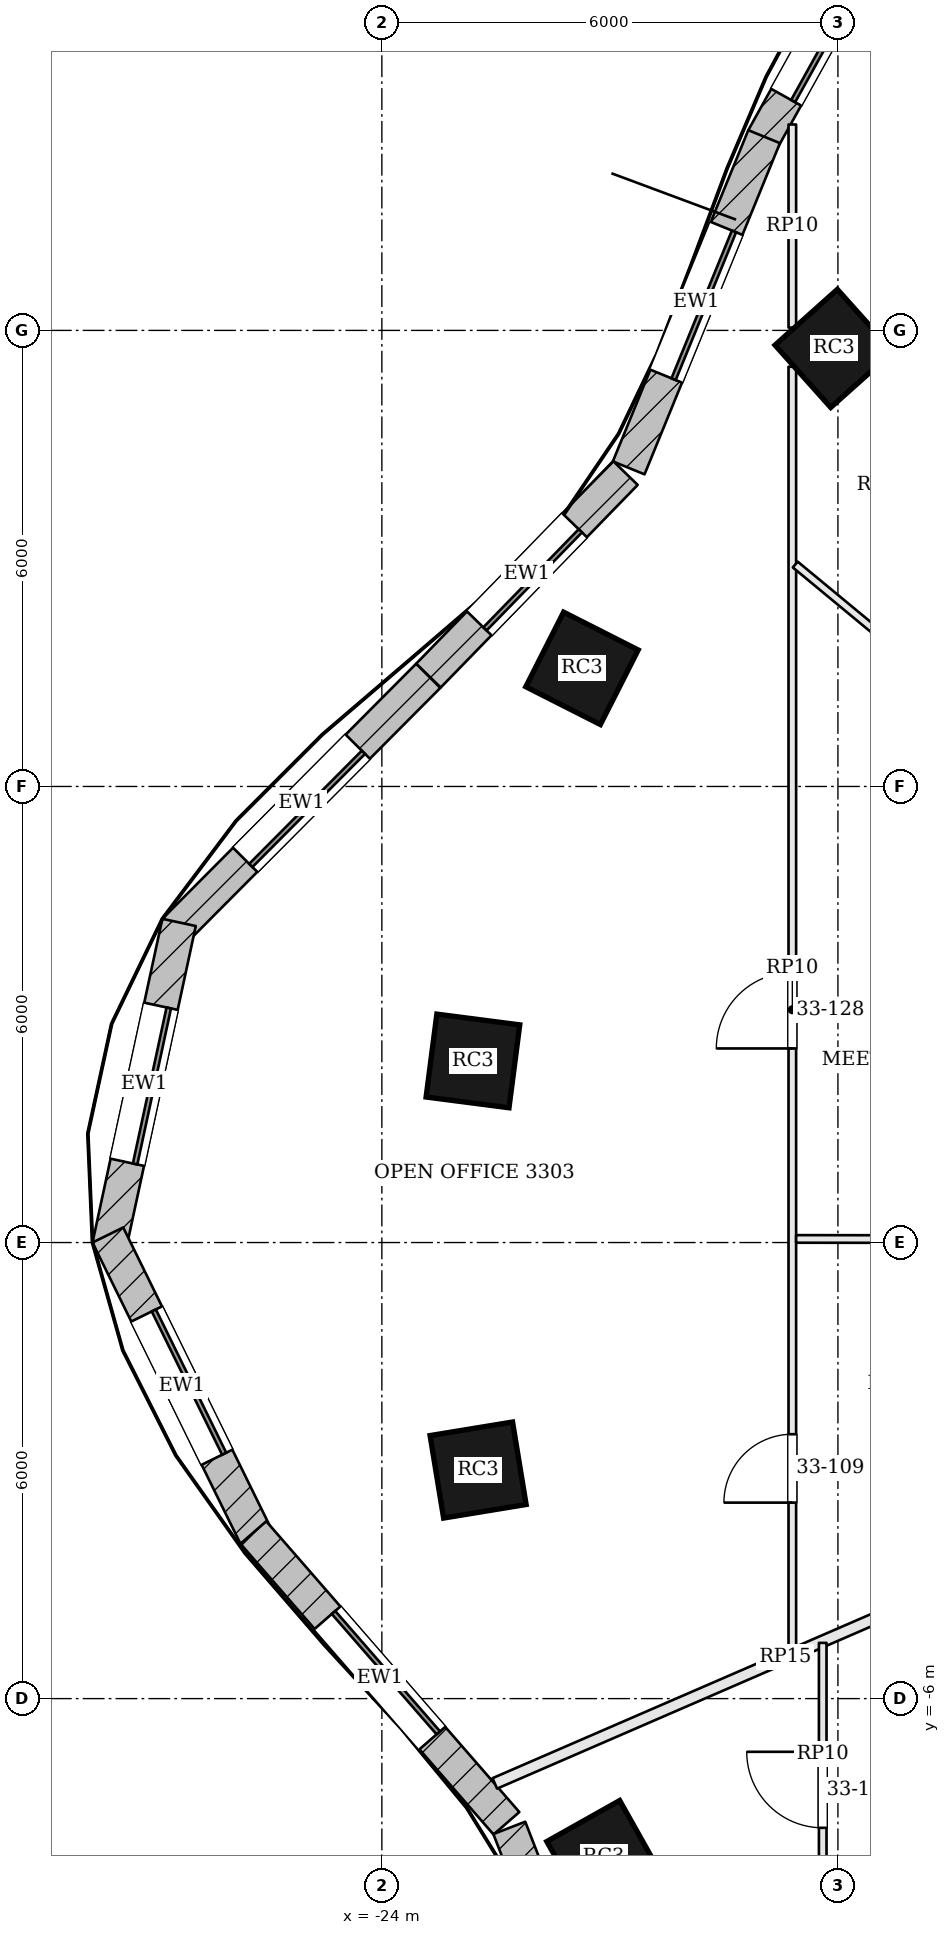
"""IFC4 building model, lengths in metres.
Left out: names, types, materials, properties, quantities, classifications, styles, units other than length and angle.
Written with IfcOpenShell. Run it as: python <this file> out.ifc"""

import sys

from ifc_helpers import new_model, si_unit, direction, frame, frame_2d, origin, origin_2d, place, context, subcontext, project, spatial, rectangle, extrude, element, fill, save


model = new_model("IFC4")
c1 = context("Model", 3, precision=1e-05, world=origin(), true_north=direction((0.0, 1.0)))
c2 = subcontext(c1, "Body", "Model", "MODEL_VIEW")
j1 = project(units=[si_unit("LENGTHUNIT", "METRE"), si_unit("PLANEANGLEUNIT", "RADIAN")], contexts=[c1])
p1 = place(None, origin())
s1 = spatial("IfcSite", under=j1, at=p1, CompositionType="ELEMENT")
p2 = place(p1, origin())
s2 = spatial("IfcBuilding", under=s1, at=p2, CompositionType="ELEMENT")
p3 = place(p2, frame((0.0, 0.0, 138.3)))
s3 = spatial("IfcBuildingStorey", under=s2, at=p3, CompositionType="ELEMENT", Elevation=138.3)
for number, where, z_axis, x_axis in (
    (1, (-18.051, 11.763, 0.0), (0.0, 0.0, 1.0), (-0.746, -0.666, 0.0)),
    (2, (-21.367, 7.554, 0.0), (0.0, 0.0, 1.0), (-0.452, -0.892, 0.0)),
    (3, (-22.802, 2.389, 0.0), (0.0, 0.0, 1.0), (-0.129, -0.992, 0.0)),
    (4, (-22.734, -2.993, 0.0), (0.0, 0.0, 1.0), (0.162, -0.987, 0.0)),
    (5, (-21.081, -8.09, 0.0), (0.0, 0.0, 1.0), (0.49, -0.872, 0.0)),
):
    element("IfcColumn", number, at=place(p3, frame(where, z_axis=z_axis, x_axis=x_axis)), inside=s3, PredefinedType="COLUMN", context=c2, shape_type="SweptSolid", body=[
        extrude(rectangle(XDim=1.1, YDim=1.1, at=origin_2d()), origin(), (0.0, 0.0, 1.0), 3.9),
    ])
p4 = place(p3, frame((-17.359, 17.447, 0.0), z_axis=(0.0, 0.0, 1.0), x_axis=(-0.485618126214, -0.874171056197, 0.0)))
e6 = element("IfcWall", 6, at=p4, inside=s3, PredefinedType="SOLIDWALL", context=c2, shape_type="SweptSolid", body=[
    extrude(rectangle(XDim=3.343, YDim=0.45, at=frame_2d((1.671, 0.0))), origin(), (0.0, 0.0, 1.0), 3.7),
])
p5 = place(p4, frame((0.621, 0.0, 0.9)))
e7 = element("IfcOpeningElement", 7, at=p5, cuts=e6, PredefinedType="OPENING", context=c2, shape_type="SweptSolid", body=[
    extrude(rectangle(XDim=2.1, YDim=2.3, at=frame_2d((1.05, 1.15))), frame((0.0, 0.235, 0.0), z_axis=(0.0, -1.0, 0.0), x_axis=(1.0, 0.0, 0.0)), (0.0, 0.0, 1.0), 0.47),
])
p6 = place(p3, frame((-18.971, 14.549, 0.0), z_axis=(0.0, 0.0, 1.0), x_axis=(-0.378434936431, -0.925627894398, 0.0)))
e8 = element("IfcWall", 8, at=p6, inside=s3, PredefinedType="SOLIDWALL", context=c2, shape_type="SweptSolid", body=[
    extrude(rectangle(XDim=4.708, YDim=0.45, at=frame_2d((2.354, 0.0))), origin(), (0.0, 0.0, 1.0), 3.7),
])
p7 = place(p6, frame((1.304, 0.0, 0.9)))
e9 = element("IfcOpeningElement", 9, at=p7, cuts=e8, PredefinedType="OPENING", context=c2, shape_type="SweptSolid", body=[
    extrude(rectangle(XDim=2.1, YDim=2.3, at=frame_2d((1.05, 1.15))), frame((0.0, 0.235, 0.0), z_axis=(0.0, -1.0, 0.0), x_axis=(1.0, 0.0, 0.0)), (0.0, 0.0, 1.0), 0.47),
])
p8 = place(p3, frame((-20.796, 10.124, 0.0), z_axis=(0.0, 0.0, 1.0), x_axis=(-0.697121527554, -0.716952980203, 0.0)))
e10 = element("IfcWall", 10, at=p8, inside=s3, PredefinedType="SOLIDWALL", context=c2, shape_type="SweptSolid", body=[
    extrude(rectangle(XDim=3.718, YDim=0.45, at=frame_2d((1.859, 0.0))), origin(), (0.0, 0.0, 1.0), 3.7),
])
p9 = place(p8, frame((0.959, 0.0, 0.9)))
e11 = element("IfcOpeningElement", 11, at=p9, cuts=e10, PredefinedType="OPENING", context=c2, shape_type="SweptSolid", body=[
    extrude(rectangle(XDim=1.8, YDim=2.3, at=frame_2d((0.9, 1.15))), frame((0.0, 0.235, 0.0), z_axis=(0.0, -1.0, 0.0), x_axis=(1.0, 0.0, 0.0)), (0.0, 0.0, 1.0), 0.47),
])
p10 = place(p3, frame((-23.39, 7.456, 0.0), z_axis=(0.0, 0.0, 1.0), x_axis=(-0.705349231702, -0.708859973011, 0.0)))
e12 = element("IfcWall", 12, at=p10, inside=s3, PredefinedType="SOLIDWALL", context=c2, shape_type="SweptSolid", body=[
    extrude(rectangle(XDim=4.729, YDim=0.45, at=frame_2d((2.364, 0.0))), origin(), (0.0, 0.0, 1.0), 3.7),
])
p11 = place(p10, frame((1.314, 0.0, 0.9)))
e13 = element("IfcOpeningElement", 13, at=p11, cuts=e12, PredefinedType="OPENING", context=c2, shape_type="SweptSolid", body=[
    extrude(rectangle(XDim=2.1, YDim=2.3, at=frame_2d((1.05, 1.15))), frame((0.0, 0.235, 0.0), z_axis=(0.0, -1.0, 0.0), x_axis=(1.0, 0.0, 0.0)), (0.0, 0.0, 1.0), 0.47),
])
p12 = place(p3, frame((-26.668, 4.211, 0.0), z_axis=(0.0, 0.0, 1.0), x_axis=(-0.210910311825, -0.977505417052, 0.0)))
e14 = element("IfcWall", 14, at=p12, inside=s3, PredefinedType="SOLIDWALL", context=c2, shape_type="SweptSolid", body=[
    extrude(rectangle(XDim=4.357, YDim=0.45, at=frame_2d((2.178, 0.0))), origin(), (0.0, 0.0, 1.0), 3.7),
])
p13 = place(p12, frame((1.128, 0.0, 0.9)))
e15 = element("IfcOpeningElement", 15, at=p13, cuts=e14, PredefinedType="OPENING", context=c2, shape_type="SweptSolid", body=[
    extrude(rectangle(XDim=2.1, YDim=2.3, at=frame_2d((1.05, 1.15))), frame((0.0, 0.235, 0.0), z_axis=(0.0, -1.0, 0.0), x_axis=(1.0, 0.0, 0.0)), (0.0, 0.0, 1.0), 0.47),
])
p14 = place(p3, frame((-27.605, 0.099, 0.0), z_axis=(0.0, 0.0, 1.0), x_axis=(0.440876526139, -0.897567762734, 0.0)))
e16 = element("IfcWall", 16, at=p14, inside=s3, PredefinedType="SOLIDWALL", context=c2, shape_type="SweptSolid", body=[
    extrude(rectangle(XDim=4.415, YDim=0.45, at=frame_2d((2.208, 0.0))), origin(), (0.0, 0.0, 1.0), 3.7),
])
p15 = place(p14, frame((1.158, 0.0, 0.9)))
e17 = element("IfcOpeningElement", 17, at=p15, cuts=e16, PredefinedType="OPENING", context=c2, shape_type="SweptSolid", body=[
    extrude(rectangle(XDim=2.1, YDim=2.3, at=frame_2d((1.05, 1.15))), frame((0.0, 0.235, 0.0), z_axis=(0.0, -1.0, 0.0), x_axis=(1.0, 0.0, 0.0)), (0.0, 0.0, 1.0), 0.47),
])
p16 = place(p3, frame((-25.691, -3.815, 0.0), z_axis=(0.0, 0.0, 1.0), x_axis=(0.656552883353, -0.754279995334, 0.0)))
e18 = element("IfcWall", 18, at=p16, inside=s3, PredefinedType="SOLIDWALL", context=c2, shape_type="SweptSolid", body=[
    extrude(rectangle(XDim=5.071, YDim=0.45, at=frame_2d((2.536, 0.0))), origin(), (0.0, 0.0, 1.0), 3.7),
])
p17 = place(p16, frame((1.486, 0.0, 0.9)))
e19 = element("IfcOpeningElement", 19, at=p17, cuts=e18, PredefinedType="OPENING", context=c2, shape_type="SweptSolid", body=[
    extrude(rectangle(XDim=2.1, YDim=2.3, at=frame_2d((1.05, 1.15))), frame((0.0, 0.235, 0.0), z_axis=(0.0, -1.0, 0.0), x_axis=(1.0, 0.0, 0.0)), (0.0, 0.0, 1.0), 0.47),
])
p18 = place(p3, frame((-22.323, -7.701, 0.0), z_axis=(0.0, 0.0, 1.0), x_axis=(0.361550075906, -0.932352692178, 0.0)))
e20 = element("IfcWall", 20, at=p18, inside=s3, PredefinedType="SOLIDWALL", context=c2, shape_type="SweptSolid", body=[
    extrude(rectangle(XDim=3.313, YDim=0.45, at=frame_2d((1.657, 0.0))), origin(), (0.0, 0.0, 1.0), 3.7),
])
p19 = place(p18, frame((0.607, 0.0, 0.9)))
e21 = element("IfcOpeningElement", 21, at=p19, cuts=e20, PredefinedType="OPENING", context=c2, shape_type="SweptSolid", body=[
    extrude(rectangle(XDim=2.1, YDim=2.3, at=frame_2d((1.05, 1.15))), frame((0.0, 0.235, 0.0), z_axis=(0.0, -1.0, 0.0), x_axis=(1.0, 0.0, 0.0)), (0.0, 0.0, 1.0), 0.47),
])
p20 = place(p3, frame((-22.514, -7.116, 0.0), z_axis=(0.0, 0.0, 1.0), x_axis=(0.917457618692, 0.397833530392, 0.0)))
e22 = element("IfcWall", 22, at=p20, inside=s3, PredefinedType="PARTITIONING", context=c2, shape_type="SweptSolid", body=[
    extrude(rectangle(XDim=8.333, YDim=0.15, at=frame_2d((4.167, 0.0))), origin(), (0.0, 0.0, 1.0), 3.198),
])
p21 = place(p3, frame((-18.6, -5.397, 0.0), z_axis=(0.0, 0.0, 1.0), x_axis=(0.0, 1.0, 0.0)))
e23 = element("IfcWall", 23, at=p21, inside=s3, PredefinedType="PARTITIONING", context=c2, shape_type="SweptSolid", body=[
    extrude(rectangle(XDim=16.919, YDim=0.1, at=frame_2d((8.459, 0.0))), origin(), (0.0, 0.0, 1.0), 3.184),
])
p22 = place(p21, frame((1.975, 0.0, 0.0)))
e24 = element("IfcOpeningElement", 24, at=p22, cuts=e23, PredefinedType="OPENING", context=c2, shape_type="SweptSolid", body=[
    extrude(rectangle(XDim=0.9, YDim=2.1, at=frame_2d((0.45, 1.05))), frame((0.0, 0.06, 0.0), z_axis=(0.0, -1.0, 0.0), x_axis=(1.0, 0.0, 0.0)), (0.0, 0.0, 1.0), 0.12),
])
p23 = place(p21, frame((7.95, 0.0, 0.0)))
e25 = element("IfcOpeningElement", 25, at=p23, cuts=e23, PredefinedType="OPENING", context=c2, shape_type="SweptSolid", body=[
    extrude(rectangle(XDim=1.0, YDim=2.4, at=frame_2d((0.5, 1.2))), frame((0.0, 0.06, 0.0), z_axis=(0.0, -1.0, 0.0), x_axis=(1.0, 0.0, 0.0)), (0.0, 0.0, 1.0), 0.12),
])
p24 = place(p3, frame((-18.6, 12.037, 0.0), z_axis=(0.0, 0.0, 1.0), x_axis=(0.0, 1.0, 0.0)))
e26 = element("IfcWall", 26, at=p24, inside=s3, PredefinedType="PARTITIONING", context=c2, shape_type="SweptSolid", body=[
    extrude(rectangle(XDim=2.672, YDim=0.1, at=frame_2d((1.336, 0.0))), origin(), (0.0, 0.0, 1.0), 3.184),
])
p25 = place(p3, frame((-14.858, 5.857, 0.0), z_axis=(0.0, 0.0, 1.0), x_axis=(-0.770605931108, 0.637311932213, 0.0)))
e27 = element("IfcWall", 27, at=p25, inside=s3, PredefinedType="PARTITIONING", context=c2, shape_type="SweptSolid", body=[
    extrude(rectangle(XDim=4.806, YDim=0.1, at=frame_2d((2.403, 0.0))), origin(), (0.0, 0.0, 1.0), 3.184),
])
p26 = place(p3, frame((-14.875, 0.043, 0.0), z_axis=(0.0, 0.0, 1.0), x_axis=(-0.999999285062, 0.001195774074, 0.0)))
e28 = element("IfcWall", 28, at=p26, inside=s3, PredefinedType="PARTITIONING", context=c2, shape_type="SweptSolid", body=[
    extrude(rectangle(XDim=3.675, YDim=0.1, at=frame_2d((1.837, 0.0))), origin(), (0.0, 0.0, 1.0), 3.184),
])
p27 = place(p3, frame((-18.2, -8.2, 0.0), z_axis=(0.0, 0.0, 1.0), x_axis=(0.0, 1.0, 0.0)))
e29 = element("IfcWall", 29, at=p27, inside=s3, PredefinedType="PARTITIONING", context=c2, shape_type="SweptSolid", body=[
    extrude(rectangle(XDim=2.933, YDim=0.1, at=frame_2d((1.467, 0.0))), origin(), (0.0, 0.0, 1.0), 3.184),
])
p28 = place(p27, frame((0.5, 0.0, 0.0)))
e30 = element("IfcOpeningElement", 30, at=p28, cuts=e29, PredefinedType="OPENING", context=c2, shape_type="SweptSolid", body=[
    extrude(rectangle(XDim=1.0, YDim=2.1, at=frame_2d((0.5, 1.05))), frame((0.0, 0.06, 0.0), z_axis=(0.0, -1.0, 0.0), x_axis=(1.0, 0.0, 0.0)), (0.0, 0.0, 1.0), 0.12),
])
p29 = place(p5, origin())
e31 = element("IfcWindow", 31, at=p29, inside=s3, PartitioningType="SINGLE_PANEL", PredefinedType="WINDOW", context=c2, shape_type="SweptSolid", body=[
    extrude(rectangle(XDim=2.1, YDim=2.3, at=frame_2d((1.05, 1.15))), frame((0.0, 0.135, 0.0), z_axis=(0.0, -1.0, 0.0), x_axis=(1.0, 0.0, 0.0)), (0.0, 0.0, 1.0), 0.06),
])
fill(e7, e31)
p30 = place(p7, origin())
e32 = element("IfcWindow", 32, at=p30, inside=s3, PartitioningType="SINGLE_PANEL", PredefinedType="WINDOW", context=c2, shape_type="SweptSolid", body=[
    extrude(rectangle(XDim=2.1, YDim=2.3, at=frame_2d((1.05, 1.15))), frame((0.0, 0.135, 0.0), z_axis=(0.0, -1.0, 0.0), x_axis=(1.0, 0.0, 0.0)), (0.0, 0.0, 1.0), 0.06),
])
fill(e9, e32)
p31 = place(p9, origin())
e33 = element("IfcWindow", 33, at=p31, inside=s3, PartitioningType="SINGLE_PANEL", PredefinedType="WINDOW", context=c2, shape_type="SweptSolid", body=[
    extrude(rectangle(XDim=1.8, YDim=2.3, at=frame_2d((0.9, 1.15))), frame((0.0, 0.135, 0.0), z_axis=(0.0, -1.0, 0.0), x_axis=(1.0, 0.0, 0.0)), (0.0, 0.0, 1.0), 0.06),
])
fill(e11, e33)
p32 = place(p11, origin())
e34 = element("IfcWindow", 34, at=p32, inside=s3, PartitioningType="SINGLE_PANEL", PredefinedType="WINDOW", context=c2, shape_type="SweptSolid", body=[
    extrude(rectangle(XDim=2.1, YDim=2.3, at=frame_2d((1.05, 1.15))), frame((0.0, 0.135, 0.0), z_axis=(0.0, -1.0, 0.0), x_axis=(1.0, 0.0, 0.0)), (0.0, 0.0, 1.0), 0.06),
])
fill(e13, e34)
p33 = place(p13, origin())
e35 = element("IfcWindow", 35, at=p33, inside=s3, PartitioningType="SINGLE_PANEL", PredefinedType="WINDOW", context=c2, shape_type="SweptSolid", body=[
    extrude(rectangle(XDim=2.1, YDim=2.3, at=frame_2d((1.05, 1.15))), frame((0.0, 0.135, 0.0), z_axis=(0.0, -1.0, 0.0), x_axis=(1.0, 0.0, 0.0)), (0.0, 0.0, 1.0), 0.06),
])
fill(e15, e35)
p34 = place(p15, origin())
e36 = element("IfcWindow", 36, at=p34, inside=s3, PartitioningType="SINGLE_PANEL", PredefinedType="WINDOW", context=c2, shape_type="SweptSolid", body=[
    extrude(rectangle(XDim=2.1, YDim=2.3, at=frame_2d((1.05, 1.15))), frame((0.0, 0.135, 0.0), z_axis=(0.0, -1.0, 0.0), x_axis=(1.0, 0.0, 0.0)), (0.0, 0.0, 1.0), 0.06),
])
fill(e17, e36)
p35 = place(p17, origin())
e37 = element("IfcWindow", 37, at=p35, inside=s3, PartitioningType="SINGLE_PANEL", PredefinedType="WINDOW", context=c2, shape_type="SweptSolid", body=[
    extrude(rectangle(XDim=2.1, YDim=2.3, at=frame_2d((1.05, 1.15))), frame((0.0, 0.135, 0.0), z_axis=(0.0, -1.0, 0.0), x_axis=(1.0, 0.0, 0.0)), (0.0, 0.0, 1.0), 0.06),
])
fill(e19, e37)
p36 = place(p22, origin())
e38 = element("IfcDoor", 38, at=p36, inside=s3, OperationType="SINGLE_SWING_LEFT", PredefinedType="DOOR", context=c2, shape_type="SweptSolid", body=[
    extrude(rectangle(XDim=0.9, YDim=2.1, at=frame_2d((0.45, 1.05))), frame((0.0, 0.025, 0.0), z_axis=(0.0, -1.0, 0.0), x_axis=(1.0, 0.0, 0.0)), (0.0, 0.0, 1.0), 0.05),
])
fill(e24, e38)
p37 = place(p28, origin())
e39 = element("IfcDoor", 39, at=p37, inside=s3, OperationType="SINGLE_SWING_RIGHT", PredefinedType="DOOR", context=c2, shape_type="SweptSolid", body=[
    extrude(rectangle(XDim=1.0, YDim=2.1, at=frame_2d((0.5, 1.05))), frame((0.0, 0.025, 0.0), z_axis=(0.0, -1.0, 0.0), x_axis=(1.0, 0.0, 0.0)), (0.0, 0.0, 1.0), 0.05),
])
fill(e30, e39)
p38 = place(p23, origin())
e40 = element("IfcDoor", 40, at=p38, inside=s3, OperationType="SINGLE_SWING_LEFT", PredefinedType="DOOR", context=c2, shape_type="SweptSolid", body=[
    extrude(rectangle(XDim=1.0, YDim=2.4, at=frame_2d((0.5, 1.2))), frame((0.0, 0.025, 0.0), z_axis=(0.0, -1.0, 0.0), x_axis=(1.0, 0.0, 0.0)), (0.0, 0.0, 1.0), 0.05),
])
fill(e25, e40)
save(model, sys.argv[1])
